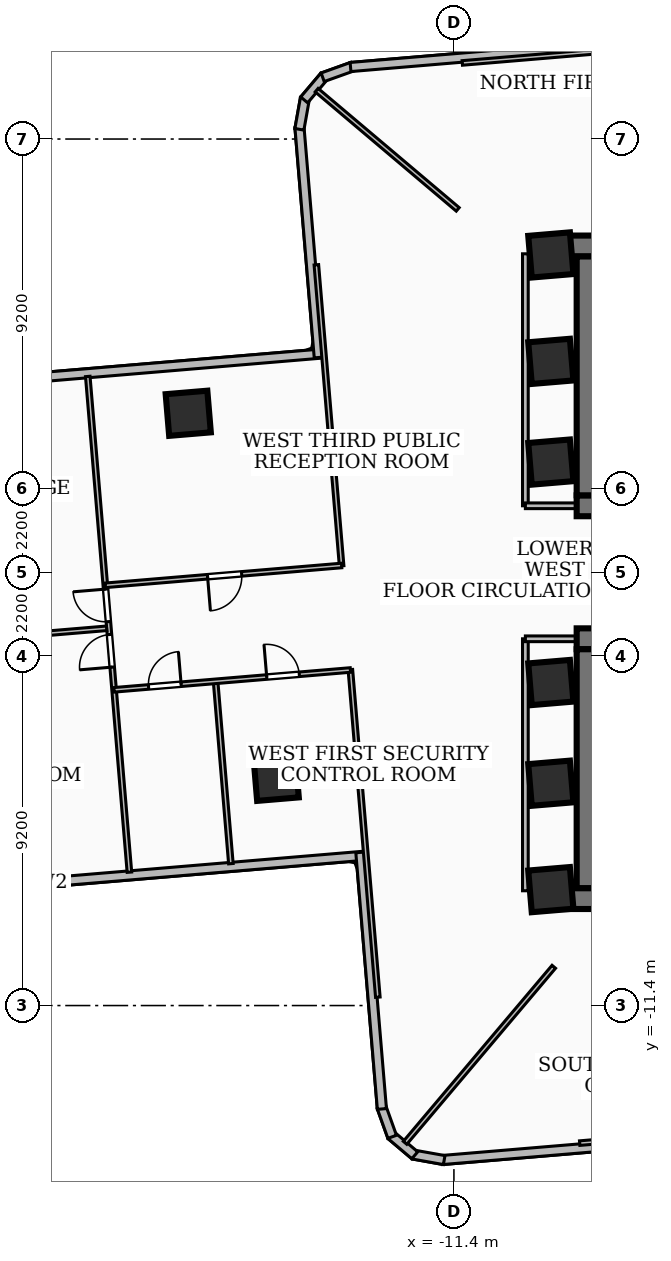
"""IFC4 building model, lengths in metres.
Left out: names, types, materials, properties, quantities, classifications, styles, units other than length and angle.
Written with IfcOpenShell. Run it as: python <this file> out.ifc"""

import sys

from ifc_helpers import new_model, si_unit, direction, frame, frame_2d, origin, origin_2d, place, context, subcontext, project, spatial, rectangle, extrude, element, fill, save


model = new_model("IFC4")
c1 = context("Model", 3, precision=1e-05, world=origin(), true_north=direction((0.0, 1.0)))
c2 = subcontext(c1, "Body", "Model", "MODEL_VIEW")
j1 = project(units=[si_unit("LENGTHUNIT", "METRE"), si_unit("PLANEANGLEUNIT", "RADIAN")], contexts=[c1])
p1 = place(None, origin())
s1 = spatial("IfcSite", under=j1, at=p1, CompositionType="ELEMENT")
p2 = place(p1, origin())
s2 = spatial("IfcBuilding", under=s1, at=p2, CompositionType="ELEMENT")
p3 = place(p2, frame((0.0, 0.0, 64.08)))
s3 = spatial("IfcBuildingStorey", under=s2, at=p3, CompositionType="ELEMENT", Elevation=64.08)
p4 = place(p3, frame((-8.78, 8.585, 0.0), z_axis=(0.0, 0.0, 1.0), x_axis=(1.0, 0.0, 0.0)))
e1 = element("IfcWall", 1, at=p4, inside=s3, PredefinedType="SHEAR", context=c2, shape_type="SweptSolid", body=[
    extrude(rectangle(XDim=17.56, YDim=0.55, at=frame_2d((8.78, 0.0))), origin(), (0.0, 0.0, 1.0), 3.34),
])
p5 = place(p3, frame((8.17, 1.75, 0.0), z_axis=(0.0, 0.0, 1.0), x_axis=(-1.0, 0.0, 0.0)))
e2 = element("IfcWall", 2, at=p5, inside=s3, PredefinedType="SHEAR", context=c2, shape_type="SweptSolid", body=[
    extrude(rectangle(XDim=16.34, YDim=0.55, at=frame_2d((8.17, 0.0))), origin(), (0.0, 0.0, 1.0), 3.34),
])
p6 = place(p5, frame((7.45, 0.0, 0.0)))
e3 = element("IfcOpeningElement", 3, at=p6, cuts=e2, PredefinedType="OPENING", context=c2, shape_type="SweptSolid", body=[
    extrude(rectangle(XDim=1.0, YDim=2.1, at=frame_2d((0.5, 1.05))), frame((0.0, 0.285, 0.0), z_axis=(0.0, -1.0, 0.0), x_axis=(1.0, 0.0, 0.0)), (0.0, 0.0, 1.0), 0.57),
])
p7 = place(p5, frame((3.85, 0.0, 0.0)))
e4 = element("IfcOpeningElement", 4, at=p7, cuts=e2, PredefinedType="OPENING", context=c2, shape_type="SweptSolid", body=[
    extrude(rectangle(XDim=0.9, YDim=2.06, at=frame_2d((0.45, 1.03))), frame((0.0, 0.285, 0.0), z_axis=(0.0, -1.0, 0.0), x_axis=(1.0, 0.0, 0.0)), (0.0, 0.0, 1.0), 0.57),
])
p8 = place(p5, frame((2.35, 0.0, 0.0)))
e5 = element("IfcOpeningElement", 5, at=p8, cuts=e2, PredefinedType="OPENING", context=c2, shape_type="SweptSolid", body=[
    extrude(rectangle(XDim=0.9, YDim=2.06, at=frame_2d((0.45, 1.03))), frame((0.0, 0.285, 0.0), z_axis=(0.0, -1.0, 0.0), x_axis=(1.0, 0.0, 0.0)), (0.0, 0.0, 1.0), 0.57),
])
p9 = place(p5, frame((0.8, 0.0, 0.0)))
e6 = element("IfcOpeningElement", 6, at=p9, cuts=e2, PredefinedType="OPENING", context=c2, shape_type="SweptSolid", body=[
    extrude(rectangle(XDim=0.9, YDim=2.06, at=frame_2d((0.45, 1.03))), frame((0.0, 0.285, 0.0), z_axis=(0.0, -1.0, 0.0), x_axis=(1.0, 0.0, 0.0)), (0.0, 0.0, 1.0), 0.57),
])
p10 = place(p3, frame((-7.895, 2.025, 0.0), z_axis=(0.0, 0.0, 1.0), x_axis=(0.0, 1.0, 0.0)))
e7 = element("IfcWall", 7, at=p10, inside=s3, PredefinedType="SHEAR", context=c2, shape_type="SweptSolid", body=[
    extrude(rectangle(XDim=6.285, YDim=0.55, at=frame_2d((3.143, 0.0))), origin(), (0.0, 0.0, 1.0), 3.34),
])
p11 = place(p3, frame((8.78, -8.585, 0.0), z_axis=(0.0, 0.0, 1.0), x_axis=(-1.0, 0.0, 0.0)))
e8 = element("IfcWall", 8, at=p11, inside=s3, PredefinedType="SHEAR", context=c2, shape_type="SweptSolid", body=[
    extrude(rectangle(XDim=17.56, YDim=0.55, at=frame_2d((8.78, 0.0))), origin(), (0.0, 0.0, 1.0), 3.34),
])
p12 = place(p3, frame((-8.17, -1.75, 0.0), z_axis=(0.0, 0.0, 1.0), x_axis=(1.0, 0.0, 0.0)))
e9 = element("IfcWall", 9, at=p12, inside=s3, PredefinedType="SHEAR", context=c2, shape_type="SweptSolid", body=[
    extrude(rectangle(XDim=16.34, YDim=0.55, at=frame_2d((8.17, 0.0))), origin(), (0.0, 0.0, 1.0), 3.34),
])
p13 = place(p12, frame((7.45, 0.0, 0.0)))
e10 = element("IfcOpeningElement", 10, at=p13, cuts=e9, PredefinedType="OPENING", context=c2, shape_type="SweptSolid", body=[
    extrude(rectangle(XDim=1.0, YDim=2.1, at=frame_2d((0.5, 1.05))), frame((0.0, 0.285, 0.0), z_axis=(0.0, -1.0, 0.0), x_axis=(1.0, 0.0, 0.0)), (0.0, 0.0, 1.0), 0.57),
])
p14 = place(p12, frame((10.965, 0.0, 0.0)))
e11 = element("IfcOpeningElement", 11, at=p14, cuts=e9, PredefinedType="OPENING", context=c2, shape_type="SweptSolid", body=[
    extrude(rectangle(XDim=1.05, YDim=2.15, at=frame_2d((0.525, 1.075))), frame((0.0, 0.285, 0.0), z_axis=(0.0, -1.0, 0.0), x_axis=(1.0, 0.0, 0.0)), (0.0, 0.0, 1.0), 0.57),
])
p15 = place(p12, frame((12.525, 0.0, 0.0)))
e12 = element("IfcOpeningElement", 12, at=p15, cuts=e9, PredefinedType="OPENING", context=c2, shape_type="SweptSolid", body=[
    extrude(rectangle(XDim=1.05, YDim=2.15, at=frame_2d((0.525, 1.075))), frame((0.0, 0.285, 0.0), z_axis=(0.0, -1.0, 0.0), x_axis=(1.0, 0.0, 0.0)), (0.0, 0.0, 1.0), 0.57),
])
p16 = place(p12, frame((14.085, 0.0, 0.0)))
e13 = element("IfcOpeningElement", 13, at=p16, cuts=e9, PredefinedType="OPENING", context=c2, shape_type="SweptSolid", body=[
    extrude(rectangle(XDim=1.05, YDim=2.15, at=frame_2d((0.525, 1.075))), frame((0.0, 0.285, 0.0), z_axis=(0.0, -1.0, 0.0), x_axis=(1.0, 0.0, 0.0)), (0.0, 0.0, 1.0), 0.57),
])
p17 = place(p3, frame((-7.895, -8.31, 0.0), z_axis=(0.0, 0.0, 1.0), x_axis=(0.0, 1.0, 0.0)))
e14 = element("IfcWall", 14, at=p17, inside=s3, PredefinedType="SHEAR", context=c2, shape_type="SweptSolid", body=[
    extrude(rectangle(XDim=6.285, YDim=0.55, at=frame_2d((3.143, 0.0))), origin(), (0.0, 0.0, 1.0), 3.34),
])
for number, where, z_axis, x_axis in (
    (15, (-8.85, -5.55, 0.0), (0.0, 0.0, 1.0), (0.996, 0.084, 0.0)),
    (16, (-8.85, -2.9, 0.0), (0.0, 0.0, 1.0), (0.996, 0.084, 0.0)),
    (17, (-8.85, 2.9, 0.0), (0.0, 0.0, 1.0), (0.996, 0.084, 0.0)),
    (18, (-8.85, 5.55, 0.0), (0.0, 0.0, 1.0), (0.996, 0.084, 0.0)),
    (19, (-8.85, 8.35, 0.0), (0.0, 0.0, 1.0), (0.996, 0.084, 0.0)),
    (20, (-8.85, -8.35, 0.0), (0.0, 0.0, 1.0), (0.996, 0.084, 0.0)),
    (21, (-18.391, 4.184, 0.0), (0.0, 0.0, 1.0), (0.996, 0.084, 0.0)),
    (22, (-16.076, -5.421, 0.0), (0.0, 0.0, 1.0), (0.996, 0.084, 0.0)),
):
    element("IfcColumn", number, at=place(p3, frame(where, z_axis=z_axis, x_axis=x_axis)), inside=s3, PredefinedType="COLUMN", context=c2, shape_type="SweptSolid", body=[
        extrude(rectangle(XDim=1.1, YDim=1.1, at=origin_2d()), origin(), (0.0, 0.0, 1.0), 3.6),
    ])
p18 = place(p3, frame((-13.758, -7.458, 0.0), z_axis=(0.0, 0.0, 1.0), x_axis=(-0.996498704409, -0.083608205999, 0.0)))
e23 = element("IfcWall", 23, at=p18, inside=s3, PredefinedType="SOLIDWALL", context=c2, shape_type="SweptSolid", body=[
    extrude(rectangle(XDim=16.875, YDim=0.24, at=frame_2d((8.438, 0.0))), origin(), (0.0, 0.0, 1.0), 2.072),
])
p19 = place(p3, frame((-31.684, 4.344, 0.0), z_axis=(0.0, 0.0, 1.0), x_axis=(0.996492776291, 0.083678831256, 0.0)))
e24 = element("IfcWall", 24, at=p19, inside=s3, PredefinedType="SOLIDWALL", context=c2, shape_type="SweptSolid", body=[
    extrude(rectangle(XDim=16.875, YDim=0.24, at=frame_2d((8.438, 0.0))), origin(), (0.0, 0.0, 1.0), 3.34),
])
p20 = place(p19, frame((1.1, 0.0, 0.85)))
e25 = element("IfcOpeningElement", 25, at=p20, cuts=e24, PredefinedType="OPENING", context=c2, shape_type="SweptSolid", body=[
    extrude(rectangle(XDim=1.8, YDim=1.6, at=frame_2d((0.9, 0.8))), frame((0.0, 0.13, 0.0), z_axis=(0.0, -1.0, 0.0), x_axis=(1.0, 0.0, 0.0)), (0.0, 0.0, 1.0), 0.26),
])
p21 = place(p3, frame((-14.956, 5.652, 0.0), z_axis=(0.0, 0.0, 1.0), x_axis=(-0.083627472659, 0.996497087711, 0.0)))
e26 = element("IfcWall", 26, at=p21, inside=s3, PredefinedType="SOLIDWALL", context=c2, shape_type="SweptSolid", body=[
    extrude(rectangle(XDim=6.075, YDim=0.24, at=frame_2d((3.038, 0.0))), origin(), (0.0, 0.0, 1.0), 3.34),
])
p22 = place(p3, frame((-15.466, 11.656, 0.0), z_axis=(0.0, 0.0, 1.0), x_axis=(0.175678791378, 0.98444754165, 0.0)))
e27 = element("IfcWall", 27, at=p22, inside=s3, PredefinedType="SOLIDWALL", context=c2, shape_type="SweptSolid", body=[
    extrude(rectangle(XDim=0.831, YDim=0.24, at=frame_2d((0.416, 0.0))), origin(), (0.0, 0.0, 1.0), 3.34),
])
p23 = place(p3, frame((-15.34, 12.43, 0.0), z_axis=(0.0, 0.0, 1.0), x_axis=(0.645767595037, 0.763534028842, 0.0)))
e28 = element("IfcWall", 28, at=p23, inside=s3, PredefinedType="SOLIDWALL", context=c2, shape_type="SweptSolid", body=[
    extrude(rectangle(XDim=0.815, YDim=0.24, at=frame_2d((0.407, 0.0))), origin(), (0.0, 0.0, 1.0), 3.34),
])
p24 = place(p3, frame((-14.854, 13.025, 0.0), z_axis=(0.0, 0.0, 1.0), x_axis=(0.941455621898, 0.337136933599, 0.0)))
e29 = element("IfcWall", 29, at=p24, inside=s3, PredefinedType="SOLIDWALL", context=c2, shape_type="SweptSolid", body=[
    extrude(rectangle(XDim=0.831, YDim=0.24, at=frame_2d((0.415, 0.0))), origin(), (0.0, 0.0, 1.0), 3.34),
])
p25 = place(p3, frame((-14.121, 13.295, 0.0), z_axis=(0.0, 0.0, 1.0), x_axis=(0.99648986367, 0.083713509088, 0.0)))
e30 = element("IfcWall", 30, at=p25, inside=s3, PredefinedType="SOLIDWALL", context=c2, shape_type="SweptSolid", body=[
    extrude(rectangle(XDim=6.775, YDim=0.24, at=frame_2d((3.387, 0.0))), origin(), (0.0, 0.0, 1.0), 3.34),
])
p26 = place(p3, frame((-5.652, -14.956, 0.0), z_axis=(0.0, 0.0, 1.0), x_axis=(-0.996497087711, -0.083627472659, 0.0)))
e31 = element("IfcWall", 31, at=p26, inside=s3, PredefinedType="SOLIDWALL", context=c2, shape_type="SweptSolid", body=[
    extrude(rectangle(XDim=6.075, YDim=0.24, at=frame_2d((3.038, 0.0))), origin(), (0.0, 0.0, 1.0), 2.072),
])
p27 = place(p3, frame((-11.656, -15.466, 0.0), z_axis=(0.0, 0.0, 1.0), x_axis=(-0.98444754165, 0.175678791378, 0.0)))
e32 = element("IfcWall", 32, at=p27, inside=s3, PredefinedType="SOLIDWALL", context=c2, shape_type="SweptSolid", body=[
    extrude(rectangle(XDim=0.831, YDim=0.24, at=frame_2d((0.416, 0.0))), origin(), (0.0, 0.0, 1.0), 3.34),
])
p28 = place(p3, frame((-12.43, -15.34, 0.0), z_axis=(0.0, 0.0, 1.0), x_axis=(-0.763534028842, 0.645767595037, 0.0)))
e33 = element("IfcWall", 33, at=p28, inside=s3, PredefinedType="SOLIDWALL", context=c2, shape_type="SweptSolid", body=[
    extrude(rectangle(XDim=0.815, YDim=0.24, at=frame_2d((0.407, 0.0))), origin(), (0.0, 0.0, 1.0), 3.34),
])
p29 = place(p3, frame((-13.025, -14.854, 0.0), z_axis=(0.0, 0.0, 1.0), x_axis=(-0.337136933599, 0.941455621898, 0.0)))
e34 = element("IfcWall", 34, at=p29, inside=s3, PredefinedType="SOLIDWALL", context=c2, shape_type="SweptSolid", body=[
    extrude(rectangle(XDim=0.831, YDim=0.24, at=frame_2d((0.415, 0.0))), origin(), (0.0, 0.0, 1.0), 3.34),
])
p30 = place(p3, frame((-13.295, -14.121, 0.0), z_axis=(0.0, 0.0, 1.0), x_axis=(-0.083713509088, 0.99648986367, 0.0)))
e35 = element("IfcWall", 35, at=p30, inside=s3, PredefinedType="SOLIDWALL", context=c2, shape_type="SweptSolid", body=[
    extrude(rectangle(XDim=6.775, YDim=0.24, at=frame_2d((3.387, 0.0))), origin(), (0.0, 0.0, 1.0), 2.072),
])
p31 = place(p3, frame((-9.52, 1.75, 0.0), z_axis=(0.0, 0.0, 1.0), x_axis=(0.0, 1.0, 0.0)))
e36 = element("IfcWall", 36, at=p31, inside=s3, PredefinedType="PARTITIONING", context=c2, shape_type="SweptSolid", body=[
    extrude(rectangle(XDim=6.63, YDim=0.15, at=frame_2d((3.315, 0.0))), origin(), (0.0, 0.0, 1.0), 2.152),
])
p32 = place(p3, frame((-7.85, 1.75, 0.0), z_axis=(0.0, 0.0, 1.0), x_axis=(-1.0, 0.0, 0.0)))
e37 = element("IfcWall", 37, at=p32, inside=s3, PredefinedType="PARTITIONING", context=c2, shape_type="SweptSolid", body=[
    extrude(rectangle(XDim=1.67, YDim=0.15, at=frame_2d((0.835, 0.0))), origin(), (0.0, 0.0, 1.0), 2.405),
])
p33 = place(p3, frame((-9.52, -8.38, 0.0), z_axis=(0.0, 0.0, 1.0), x_axis=(0.0, 1.0, 0.0)))
e38 = element("IfcWall", 38, at=p33, inside=s3, PredefinedType="PARTITIONING", context=c2, shape_type="SweptSolid", body=[
    extrude(rectangle(XDim=6.63, YDim=0.15, at=frame_2d((3.315, 0.0))), origin(), (0.0, 0.0, 1.0), 2.152),
])
p34 = place(p3, frame((-7.85, -1.75, 0.0), z_axis=(0.0, 0.0, 1.0), x_axis=(-1.0, 0.0, 0.0)))
e39 = element("IfcWall", 39, at=p34, inside=s3, PredefinedType="PARTITIONING", context=c2, shape_type="SweptSolid", body=[
    extrude(rectangle(XDim=1.67, YDim=0.15, at=frame_2d((0.835, 0.0))), origin(), (0.0, 0.0, 1.0), 2.405),
])
p35 = place(p3, frame((-11.3, 9.549, 0.0), z_axis=(0.0, 0.0, 1.0), x_axis=(-0.763780578352, 0.645475970221, 0.0)))
e40 = element("IfcWall", 40, at=p35, inside=s3, PredefinedType="PARTITIONING", context=c2, shape_type="SweptSolid", body=[
    extrude(rectangle(XDim=4.86, YDim=0.12, at=frame_2d((2.43, 0.0))), origin(), (0.0, 0.0, 1.0), 3.34),
])
p36 = place(p3, frame((-8.772, -10.38, 0.0), z_axis=(0.0, 0.0, 1.0), x_axis=(-0.645424146464, -0.763824371935, 0.0)))
e41 = element("IfcWall", 41, at=p36, inside=s3, PredefinedType="PARTITIONING", context=c2, shape_type="SweptSolid", body=[
    extrude(rectangle(XDim=6.064, YDim=0.12, at=frame_2d((3.032, 0.0))), origin(), (0.0, 0.0, 1.0), 2.072),
])
p37 = place(p3, frame((-2.561, 14.125, 0.0), z_axis=(0.0, 0.0, 1.0), x_axis=(-0.996501035323, -0.083580419953, 0.0)))
e42 = element("IfcWall", 42, at=p37, inside=s3, PredefinedType="PARTITIONING", context=c2, shape_type="SweptSolid", body=[
    extrude(rectangle(XDim=8.649, YDim=0.12, at=frame_2d((4.325, 0.0))), origin(), (0.0, 0.0, 1.0), 2.152),
])
p38 = place(p3, frame((-14.125, -2.561, 0.0), z_axis=(0.0, 0.0, 1.0), x_axis=(0.083580419953, -0.996501035323, 0.0)))
e43 = element("IfcWall", 43, at=p38, inside=s3, PredefinedType="PARTITIONING", context=c2, shape_type="SweptSolid", body=[
    extrude(rectangle(XDim=8.649, YDim=0.12, at=frame_2d((4.325, 0.0))), origin(), (0.0, 0.0, 1.0), 2.072),
])
p39 = place(p3, frame((-15.02, 8.091, 0.0), z_axis=(0.0, 0.0, 1.0), x_axis=(0.083652878615, -0.99649495528, 0.0)))
e44 = element("IfcWall", 44, at=p39, inside=s3, PredefinedType="PARTITIONING", context=c2, shape_type="SweptSolid", body=[
    extrude(rectangle(XDim=7.95, YDim=0.12, at=frame_2d((3.975, 0.0))), origin(), (0.0, 0.0, 1.0), 2.152),
])
p40 = place(p3, frame((-17.67, -2.889, 0.0), z_axis=(0.0, 0.0, 1.0), x_axis=(0.083605906161, -0.996498897368, 0.0)))
e45 = element("IfcWall", 45, at=p40, inside=s3, PredefinedType="PARTITIONING", context=c2, shape_type="SweptSolid", body=[
    extrude(rectangle(XDim=4.795, YDim=0.12, at=frame_2d((2.397, 0.0))), origin(), (0.0, 0.0, 1.0), 2.152),
])
p41 = place(p3, frame((-20.343, -3.093, 0.0), z_axis=(0.0, 0.0, 1.0), x_axis=(0.996496210368, 0.083637926344, 0.0)))
e46 = element("IfcWall", 46, at=p41, inside=s3, PredefinedType="PARTITIONING", context=c2, shape_type="SweptSolid", body=[
    extrude(rectangle(XDim=6.241, YDim=0.12, at=frame_2d((3.121, 0.0))), origin(), (0.0, 0.0, 1.0), 2.152),
])
p42 = place(p41, frame((4.031, 0.0, 0.0)))
e47 = element("IfcOpeningElement", 47, at=p42, cuts=e46, PredefinedType="OPENING", context=c2, shape_type="SweptSolid", body=[
    extrude(rectangle(XDim=0.86, YDim=2.04, at=frame_2d((0.43, 1.02))), frame((0.0, 0.07, 0.0), z_axis=(0.0, -1.0, 0.0), x_axis=(1.0, 0.0, 0.0)), (0.0, 0.0, 1.0), 0.14),
])
p43 = place(p41, frame((0.911, 0.0, 0.0)))
e48 = element("IfcOpeningElement", 48, at=p43, cuts=e46, PredefinedType="OPENING", context=c2, shape_type="SweptSolid", body=[
    extrude(rectangle(XDim=0.86, YDim=2.04, at=frame_2d((0.43, 1.02))), frame((0.0, 0.07, 0.0), z_axis=(0.0, -1.0, 0.0), x_axis=(1.0, 0.0, 0.0)), (0.0, 0.0, 1.0), 0.14),
])
p44 = place(p3, frame((-14.355, 0.179, 0.0), z_axis=(0.0, 0.0, 1.0), x_axis=(-0.996495115495, -0.083650970078, 0.0)))
e49 = element("IfcWall", 49, at=p44, inside=s3, PredefinedType="PARTITIONING", context=c2, shape_type="SweptSolid", body=[
    extrude(rectangle(XDim=6.24, YDim=0.12, at=frame_2d((3.12, 0.0))), origin(), (0.0, 0.0, 1.0), 2.152),
])
p45 = place(p44, frame((2.64, 0.0, 0.0)))
e50 = element("IfcOpeningElement", 50, at=p45, cuts=e49, PredefinedType="OPENING", context=c2, shape_type="SweptSolid", body=[
    extrude(rectangle(XDim=0.9, YDim=2.06, at=frame_2d((0.45, 1.03))), frame((0.0, 0.07, 0.0), z_axis=(0.0, -1.0, 0.0), x_axis=(1.0, 0.0, 0.0)), (0.0, 0.0, 1.0), 0.14),
])
p46 = place(p3, frame((-20.539, -1.474, 0.0), z_axis=(0.0, 0.0, 1.0), x_axis=(-0.996497343043, -0.083624430094, 0.0)))
e51 = element("IfcWall", 51, at=p46, inside=s3, PredefinedType="PARTITIONING", context=c2, shape_type="SweptSolid", body=[
    extrude(rectangle(XDim=12.005, YDim=0.12, at=frame_2d((6.002, 0.0))), origin(), (0.0, 0.0, 1.0), 2.152),
])
p47 = place(p3, frame((-19.939, -7.891, 0.0), z_axis=(0.0, 0.0, 1.0), x_axis=(-0.083723060433, 0.99648906123, 0.0)))
e52 = element("IfcWall", 52, at=p47, inside=s3, PredefinedType="PARTITIONING", context=c2, shape_type="SweptSolid", body=[
    extrude(rectangle(XDim=13.09, YDim=0.12, at=frame_2d((6.545, 0.0))), origin(), (0.0, 0.0, 1.0), 2.152),
])
p48 = place(p47, frame((6.615, 0.0, 0.0)))
e53 = element("IfcOpeningElement", 53, at=p48, cuts=e52, PredefinedType="OPENING", context=c2, shape_type="SweptSolid", body=[
    extrude(rectangle(XDim=0.86, YDim=2.04, at=frame_2d((0.43, 1.02))), frame((0.0, 0.07, 0.0), z_axis=(0.0, -1.0, 0.0), x_axis=(1.0, 0.0, 0.0)), (0.0, 0.0, 1.0), 0.14),
])
p49 = place(p47, frame((5.415, 0.0, 0.0)))
e54 = element("IfcOpeningElement", 54, at=p49, cuts=e52, PredefinedType="OPENING", context=c2, shape_type="SweptSolid", body=[
    extrude(rectangle(XDim=0.86, YDim=2.04, at=frame_2d((0.43, 1.02))), frame((0.0, 0.07, 0.0), z_axis=(0.0, -1.0, 0.0), x_axis=(1.0, 0.0, 0.0)), (0.0, 0.0, 1.0), 0.14),
])
p50 = place(p3, frame((-8.091, -15.02, 0.0), z_axis=(0.0, 0.0, 1.0), x_axis=(0.99649495528, 0.083652878615, 0.0)))
e55 = element("IfcWall", 55, at=p50, inside=s3, PredefinedType="PARTITIONING", context=c2, shape_type="SweptSolid", body=[
    extrude(rectangle(XDim=7.95, YDim=0.12, at=frame_2d((3.975, 0.0))), origin(), (0.0, 0.0, 1.0), 2.072),
])
p51 = place(p42, origin())
e56 = element("IfcDoor", 56, at=p51, inside=s3, OperationType="SINGLE_SWING_LEFT", PredefinedType="DOOR", context=c2, shape_type="SweptSolid", body=[
    extrude(rectangle(XDim=0.86, YDim=2.04, at=frame_2d((0.43, 1.02))), frame((0.0, 0.025, 0.0), z_axis=(0.0, -1.0, 0.0), x_axis=(1.0, 0.0, 0.0)), (0.0, 0.0, 1.0), 0.05),
])
fill(e47, e56)
p52 = place(p43, origin())
e57 = element("IfcDoor", 57, at=p52, inside=s3, OperationType="SINGLE_SWING_RIGHT", PredefinedType="DOOR", context=c2, shape_type="SweptSolid", body=[
    extrude(rectangle(XDim=0.86, YDim=2.04, at=frame_2d((0.43, 1.02))), frame((0.0, 0.025, 0.0), z_axis=(0.0, -1.0, 0.0), x_axis=(1.0, 0.0, 0.0)), (0.0, 0.0, 1.0), 0.05),
])
fill(e48, e57)
p53 = place(p45, origin())
e58 = element("IfcDoor", 58, at=p53, inside=s3, OperationType="SINGLE_SWING_RIGHT", PredefinedType="DOOR", context=c2, shape_type="SweptSolid", body=[
    extrude(rectangle(XDim=0.9, YDim=2.06, at=frame_2d((0.45, 1.03))), frame((0.0, 0.025, 0.0), z_axis=(0.0, -1.0, 0.0), x_axis=(1.0, 0.0, 0.0)), (0.0, 0.0, 1.0), 0.05),
])
fill(e50, e58)
p54 = place(p48, origin())
e59 = element("IfcDoor", 59, at=p54, inside=s3, OperationType="SINGLE_SWING_RIGHT", PredefinedType="DOOR", context=c2, shape_type="SweptSolid", body=[
    extrude(rectangle(XDim=0.86, YDim=2.04, at=frame_2d((0.43, 1.02))), frame((0.0, 0.025, 0.0), z_axis=(0.0, -1.0, 0.0), x_axis=(1.0, 0.0, 0.0)), (0.0, 0.0, 1.0), 0.05),
])
fill(e53, e59)
p55 = place(p49, origin())
e60 = element("IfcDoor", 60, at=p55, inside=s3, OperationType="SINGLE_SWING_LEFT", PredefinedType="DOOR", context=c2, shape_type="SweptSolid", body=[
    extrude(rectangle(XDim=0.86, YDim=2.04, at=frame_2d((0.43, 1.02))), frame((0.0, 0.025, 0.0), z_axis=(0.0, -1.0, 0.0), x_axis=(1.0, 0.0, 0.0)), (0.0, 0.0, 1.0), 0.05),
])
fill(e54, e60)
save(model, sys.argv[1])
